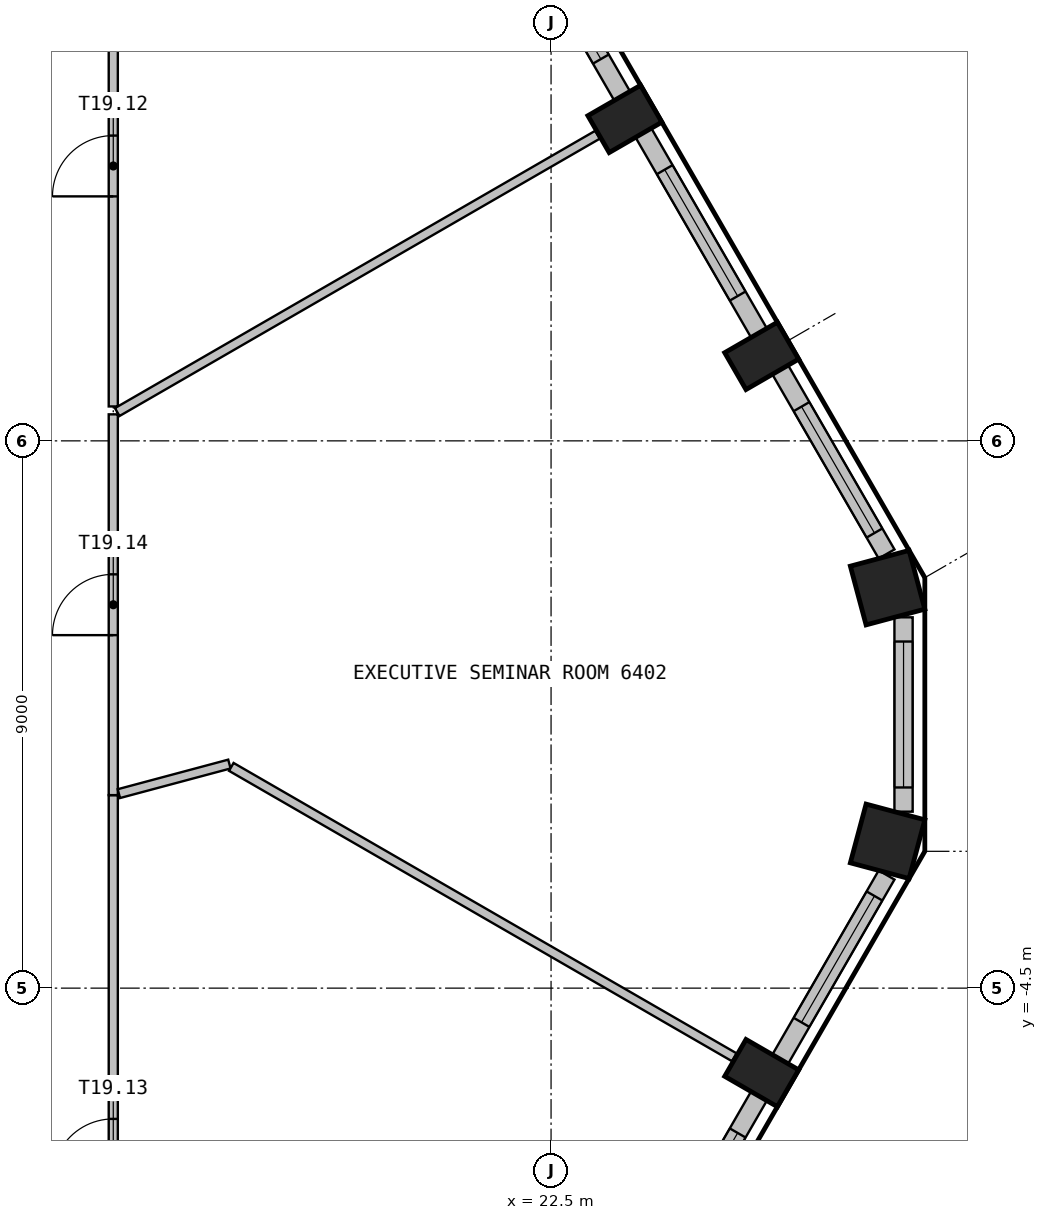
"""IFC4 building model, lengths in metres.
Left out: names, types, materials, properties, quantities, classifications, styles, units other than length and angle.
Written with IfcOpenShell. Run it as: python <this file> out.ifc"""

import sys

from ifc_helpers import new_model, si_unit, direction, frame, frame_2d, origin, origin_2d, place, context, subcontext, project, spatial, rectangle, extrude, element, fill, save


model = new_model("IFC4")
c1 = context("Model", 3, precision=1e-05, world=origin(), true_north=direction((0.0, 1.0)))
c2 = subcontext(c1, "Body", "Model", "MODEL_VIEW")
j1 = project(units=[si_unit("LENGTHUNIT", "METRE"), si_unit("PLANEANGLEUNIT", "RADIAN")], contexts=[c1])
p1 = place(None, origin())
s1 = spatial("IfcSite", under=j1, at=p1, CompositionType="ELEMENT")
p2 = place(p1, origin())
s2 = spatial("IfcBuilding", under=s1, at=p2, CompositionType="ELEMENT")
p3 = place(p2, frame((0.0, 0.0, 258.6)))
s3 = spatial("IfcBuildingStorey", under=s2, at=p3, CompositionType="ELEMENT", Elevation=258.6)
p4 = place(p3, frame((25.964, -5.897, 0.0), z_axis=(0.0, 0.0, 1.0), x_axis=(0.5, 0.866025403784, 0.0)))
e1 = element("IfcColumn", 1, at=p4, inside=s3, PredefinedType="COLUMN", context=c2, shape_type="SweptSolid", body=[
    extrude(rectangle(XDim=0.7, YDim=1.0, at=origin_2d()), origin(), (0.0, 0.0, 1.0), 3.575),
])
for number, where, z_axis, x_axis in (
    (2, (28.035, -2.086, 0.0), (0.0, 0.0, 1.0), (0.259, 0.966, 0.0)),
    (3, (28.035, 2.086, 0.0), (0.0, 0.0, 1.0), (-0.259, 0.966, 0.0)),
):
    element("IfcColumn", number, at=place(p3, frame(where, z_axis=z_axis, x_axis=x_axis)), inside=s3, PredefinedType="COLUMN", context=c2, shape_type="SweptSolid", body=[
        extrude(rectangle(XDim=1.0, YDim=1.0, at=origin_2d()), origin(), (0.0, 0.0, 1.0), 3.575),
    ])
for number, where, z_axis, x_axis in (
    (4, (25.964, 5.897, 0.0), (0.0, 0.0, 1.0), (-0.5, 0.866, 0.0)),
    (5, (23.714, 9.794, 0.0), (0.0, 0.0, 1.0), (-0.5, 0.866, 0.0)),
):
    element("IfcColumn", number, at=place(p3, frame(where, z_axis=z_axis, x_axis=x_axis)), inside=s3, PredefinedType="COLUMN", context=c2, shape_type="SweptSolid", body=[
        extrude(rectangle(XDim=0.7, YDim=1.0, at=origin_2d()), origin(), (0.0, 0.0, 1.0), 3.575),
    ])
p5 = place(p3, frame((24.019, -9.566, 0.0), z_axis=(0.0, 0.0, 1.0), x_axis=(0.499982058975, 0.866035761792, 0.0)))
e6 = element("IfcWall", 6, at=p5, inside=s3, PredefinedType="SOLIDWALL", context=c2, shape_type="SweptSolid", body=[
    extrude(rectangle(XDim=3.799, YDim=0.3, at=frame_2d((1.899, 0.0))), origin(), (0.0, 0.0, 1.0), 3.575),
])
p6 = place(p5, frame((0.699, 0.0, 0.9)))
e7 = element("IfcOpeningElement", 7, at=p6, cuts=e6, PredefinedType="OPENING", context=c2, shape_type="SweptSolid", body=[
    extrude(rectangle(XDim=2.4, YDim=2.1, at=frame_2d((1.2, 1.05))), frame((0.0, 0.16, 0.0), z_axis=(0.0, -1.0, 0.0), x_axis=(1.0, 0.0, 0.0)), (0.0, 0.0, 1.0), 0.32),
])
p7 = place(p3, frame((26.269, -5.669, 0.0), z_axis=(0.0, 0.0, 1.0), x_axis=(0.499990325971, 0.866030989016, 0.0)))
e8 = element("IfcWall", 8, at=p7, inside=s3, PredefinedType="SOLIDWALL", context=c2, shape_type="SweptSolid", body=[
    extrude(rectangle(XDim=3.498, YDim=0.3, at=frame_2d((1.749, 0.0))), origin(), (0.0, 0.0, 1.0), 3.575),
])
p8 = place(p7, frame((0.699, 0.0, 0.9)))
e9 = element("IfcOpeningElement", 9, at=p8, cuts=e8, PredefinedType="OPENING", context=c2, shape_type="SweptSolid", body=[
    extrude(rectangle(XDim=2.4, YDim=2.1, at=frame_2d((1.2, 1.05))), frame((0.0, 0.16, 0.0), z_axis=(0.0, -1.0, 0.0), x_axis=(1.0, 0.0, 0.0)), (0.0, 0.0, 1.0), 0.32),
])
p9 = place(p3, frame((28.297, -1.598, 0.0), z_axis=(0.0, 0.0, 1.0), x_axis=(0.0, 1.0, 0.0)))
e10 = element("IfcWall", 10, at=p9, inside=s3, PredefinedType="SOLIDWALL", context=c2, shape_type="SweptSolid", body=[
    extrude(rectangle(XDim=3.196, YDim=0.3, at=frame_2d((1.598, 0.0))), origin(), (0.0, 0.0, 1.0), 3.575),
])
p10 = place(p9, frame((0.398, 0.0, 0.9)))
e11 = element("IfcOpeningElement", 11, at=p10, cuts=e10, PredefinedType="OPENING", context=c2, shape_type="SweptSolid", body=[
    extrude(rectangle(XDim=2.4, YDim=2.1, at=frame_2d((1.2, 1.05))), frame((0.0, 0.16, 0.0), z_axis=(0.0, -1.0, 0.0), x_axis=(1.0, 0.0, 0.0)), (0.0, 0.0, 1.0), 0.32),
])
p11 = place(p3, frame((28.018, 2.64, 0.0), z_axis=(0.0, 0.0, 1.0), x_axis=(-0.499990325971, 0.866030989016, 0.0)))
e12 = element("IfcWall", 12, at=p11, inside=s3, PredefinedType="SOLIDWALL", context=c2, shape_type="SweptSolid", body=[
    extrude(rectangle(XDim=3.498, YDim=0.3, at=frame_2d((1.749, 0.0))), origin(), (0.0, 0.0, 1.0), 3.575),
])
p12 = place(p11, frame((0.398, 0.0, 0.9)))
e13 = element("IfcOpeningElement", 13, at=p12, cuts=e12, PredefinedType="OPENING", context=c2, shape_type="SweptSolid", body=[
    extrude(rectangle(XDim=2.4, YDim=2.1, at=frame_2d((1.2, 1.05))), frame((0.0, 0.16, 0.0), z_axis=(0.0, -1.0, 0.0), x_axis=(1.0, 0.0, 0.0)), (0.0, 0.0, 1.0), 0.32),
])
p13 = place(p3, frame((25.919, 6.276, 0.0), z_axis=(0.0, 0.0, 1.0), x_axis=(-0.499982058975, 0.866035761792, 0.0)))
e14 = element("IfcWall", 14, at=p13, inside=s3, PredefinedType="SOLIDWALL", context=c2, shape_type="SweptSolid", body=[
    extrude(rectangle(XDim=3.799, YDim=0.3, at=frame_2d((1.899, 0.0))), origin(), (0.0, 0.0, 1.0), 3.575),
])
p14 = place(p13, frame((0.699, 0.0, 0.9)))
e15 = element("IfcOpeningElement", 15, at=p14, cuts=e14, PredefinedType="OPENING", context=c2, shape_type="SweptSolid", body=[
    extrude(rectangle(XDim=2.4, YDim=2.1, at=frame_2d((1.2, 1.05))), frame((0.0, 0.16, 0.0), z_axis=(0.0, -1.0, 0.0), x_axis=(1.0, 0.0, 0.0)), (0.0, 0.0, 1.0), 0.32),
])
p15 = place(p3, frame((23.669, 10.173, 0.0), z_axis=(0.0, 0.0, 1.0), x_axis=(-0.499982058975, 0.866035761792, 0.0)))
e16 = element("IfcWall", 16, at=p15, inside=s3, PredefinedType="SOLIDWALL", context=c2, shape_type="SweptSolid", body=[
    extrude(rectangle(XDim=3.799, YDim=0.3, at=frame_2d((1.899, 0.0))), origin(), (0.0, 0.0, 1.0), 3.575),
])
p16 = place(p15, frame((0.699, 0.0, 0.9)))
e17 = element("IfcOpeningElement", 17, at=p16, cuts=e16, PredefinedType="OPENING", context=c2, shape_type="SweptSolid", body=[
    extrude(rectangle(XDim=2.4, YDim=2.1, at=frame_2d((1.2, 1.05))), frame((0.0, 0.16, 0.0), z_axis=(0.0, -1.0, 0.0), x_axis=(1.0, 0.0, 0.0)), (0.0, 0.0, 1.0), 0.32),
])
p17 = place(p3, frame((15.3, -12.975, 0.0), z_axis=(0.0, 0.0, 1.0), x_axis=(0.0, 1.0, 0.0)))
e18 = element("IfcWall", 18, at=p17, inside=s3, PredefinedType="PARTITIONING", context=c2, shape_type="SweptSolid", body=[
    extrude(rectangle(XDim=11.649, YDim=0.15, at=frame_2d((5.825, 0.0))), origin(), (0.0, 0.0, 1.0), 3.575),
])
p18 = place(p17, frame((5.324, 0.0, 0.0)))
e19 = element("IfcOpeningElement", 19, at=p18, cuts=e18, PredefinedType="OPENING", context=c2, shape_type="SweptSolid", body=[
    extrude(rectangle(XDim=1.0, YDim=2.1, at=frame_2d((0.5, 1.05))), frame((0.0, 0.085, 0.0), z_axis=(0.0, -1.0, 0.0), x_axis=(1.0, 0.0, 0.0)), (0.0, 0.0, 1.0), 0.17),
])
p19 = place(p3, frame((15.3, -1.326, 0.0), z_axis=(0.0, 0.0, 1.0), x_axis=(0.0, 1.0, 0.0)))
e20 = element("IfcWall", 20, at=p19, inside=s3, PredefinedType="PARTITIONING", context=c2, shape_type="SweptSolid", body=[
    extrude(rectangle(XDim=6.262, YDim=0.15, at=frame_2d((3.131, 0.0))), origin(), (0.0, 0.0, 1.0), 3.575),
])
p20 = place(p19, frame((2.631, 0.0, 0.0)))
e21 = element("IfcOpeningElement", 21, at=p20, cuts=e20, PredefinedType="OPENING", context=c2, shape_type="SweptSolid", body=[
    extrude(rectangle(XDim=1.0, YDim=2.1, at=frame_2d((0.5, 1.05))), frame((0.0, 0.085, 0.0), z_axis=(0.0, -1.0, 0.0), x_axis=(1.0, 0.0, 0.0)), (0.0, 0.0, 1.0), 0.17),
])
p21 = place(p3, frame((15.392, -1.302, 0.0), z_axis=(0.0, 0.0, 1.0), x_axis=(0.966004184231, 0.258526432009, 0.0)))
e22 = element("IfcWall", 22, at=p21, inside=s3, PredefinedType="PARTITIONING", context=c2, shape_type="SweptSolid", body=[
    extrude(rectangle(XDim=1.882, YDim=0.15, at=frame_2d((0.941, 0.0))), origin(), (0.0, 0.0, 1.0), 3.575),
])
p22 = place(p3, frame((15.3, 5.066, 0.0), z_axis=(0.0, 0.0, 1.0), x_axis=(0.0, 1.0, 0.0)))
e23 = element("IfcWall", 23, at=p22, inside=s3, PredefinedType="PARTITIONING", context=c2, shape_type="SweptSolid", body=[
    extrude(rectangle(XDim=7.909, YDim=0.15, at=frame_2d((3.955, 0.0))), origin(), (0.0, 0.0, 1.0), 3.575),
])
p23 = place(p22, frame((3.455, 0.0, 0.0)))
e24 = element("IfcOpeningElement", 24, at=p23, cuts=e23, PredefinedType="OPENING", context=c2, shape_type="SweptSolid", body=[
    extrude(rectangle(XDim=1.0, YDim=2.1, at=frame_2d((0.5, 1.05))), frame((0.0, 0.085, 0.0), z_axis=(0.0, -1.0, 0.0), x_axis=(1.0, 0.0, 0.0)), (0.0, 0.0, 1.0), 0.17),
])
p24 = place(p3, frame((23.264, 9.534, 0.0), z_axis=(0.0, 0.0, 1.0), x_axis=(-0.866009068046, -0.500028293261, 0.0)))
e25 = element("IfcWall", 25, at=p24, inside=s3, PredefinedType="PARTITIONING", context=c2, shape_type="SweptSolid", body=[
    extrude(rectangle(XDim=9.121, YDim=0.15, at=frame_2d((4.561, 0.0))), origin(), (0.0, 0.0, 1.0), 3.575),
])
p25 = place(p3, frame((17.241, -0.862, 0.0), z_axis=(0.0, 0.0, 1.0), x_axis=(0.86605322396, -0.499951810946, 0.0)))
e26 = element("IfcWall", 26, at=p25, inside=s3, PredefinedType="PARTITIONING", context=c2, shape_type="SweptSolid", body=[
    extrude(rectangle(XDim=9.552, YDim=0.15, at=frame_2d((4.776, 0.0))), origin(), (0.0, 0.0, 1.0), 3.575),
])
p26 = place(p6, origin())
e27 = element("IfcWindow", 27, at=p26, inside=s3, PartitioningType="SINGLE_PANEL", PredefinedType="WINDOW", context=c2, shape_type="SweptSolid", body=[
    extrude(rectangle(XDim=2.4, YDim=2.1, at=frame_2d((1.2, 1.05))), frame((0.0, 0.03, 0.0), z_axis=(0.0, -1.0, 0.0), x_axis=(1.0, 0.0, 0.0)), (0.0, 0.0, 1.0), 0.06),
])
fill(e7, e27)
p27 = place(p8, origin())
e28 = element("IfcWindow", 28, at=p27, inside=s3, PartitioningType="SINGLE_PANEL", PredefinedType="WINDOW", context=c2, shape_type="SweptSolid", body=[
    extrude(rectangle(XDim=2.4, YDim=2.1, at=frame_2d((1.2, 1.05))), frame((0.0, 0.03, 0.0), z_axis=(0.0, -1.0, 0.0), x_axis=(1.0, 0.0, 0.0)), (0.0, 0.0, 1.0), 0.06),
])
fill(e9, e28)
p28 = place(p10, origin())
e29 = element("IfcWindow", 29, at=p28, inside=s3, PartitioningType="SINGLE_PANEL", PredefinedType="WINDOW", context=c2, shape_type="SweptSolid", body=[
    extrude(rectangle(XDim=2.4, YDim=2.1, at=frame_2d((1.2, 1.05))), frame((0.0, 0.03, 0.0), z_axis=(0.0, -1.0, 0.0), x_axis=(1.0, 0.0, 0.0)), (0.0, 0.0, 1.0), 0.06),
])
fill(e11, e29)
p29 = place(p12, origin())
e30 = element("IfcWindow", 30, at=p29, inside=s3, PartitioningType="SINGLE_PANEL", PredefinedType="WINDOW", context=c2, shape_type="SweptSolid", body=[
    extrude(rectangle(XDim=2.4, YDim=2.1, at=frame_2d((1.2, 1.05))), frame((0.0, 0.03, 0.0), z_axis=(0.0, -1.0, 0.0), x_axis=(1.0, 0.0, 0.0)), (0.0, 0.0, 1.0), 0.06),
])
fill(e13, e30)
p30 = place(p14, origin())
e31 = element("IfcWindow", 31, at=p30, inside=s3, PartitioningType="SINGLE_PANEL", PredefinedType="WINDOW", context=c2, shape_type="SweptSolid", body=[
    extrude(rectangle(XDim=2.4, YDim=2.1, at=frame_2d((1.2, 1.05))), frame((0.0, 0.03, 0.0), z_axis=(0.0, -1.0, 0.0), x_axis=(1.0, 0.0, 0.0)), (0.0, 0.0, 1.0), 0.06),
])
fill(e15, e31)
p31 = place(p16, origin())
e32 = element("IfcWindow", 32, at=p31, inside=s3, PartitioningType="SINGLE_PANEL", PredefinedType="WINDOW", context=c2, shape_type="SweptSolid", body=[
    extrude(rectangle(XDim=2.4, YDim=2.1, at=frame_2d((1.2, 1.05))), frame((0.0, 0.03, 0.0), z_axis=(0.0, -1.0, 0.0), x_axis=(1.0, 0.0, 0.0)), (0.0, 0.0, 1.0), 0.06),
])
fill(e17, e32)
p32 = place(p23, origin())
e33 = element("IfcDoor", 33, at=p32, inside=s3, OperationType="SINGLE_SWING_RIGHT", PredefinedType="DOOR", context=c2, shape_type="SweptSolid", body=[
    extrude(rectangle(XDim=1.0, YDim=2.1, at=frame_2d((0.5, 1.05))), frame((0.0, 0.025, 0.0), z_axis=(0.0, -1.0, 0.0), x_axis=(1.0, 0.0, 0.0)), (0.0, 0.0, 1.0), 0.05),
])
fill(e24, e33)
p33 = place(p18, origin())
e34 = element("IfcDoor", 34, at=p33, inside=s3, OperationType="SINGLE_SWING_LEFT", PredefinedType="DOOR", context=c2, shape_type="SweptSolid", body=[
    extrude(rectangle(XDim=1.0, YDim=2.1, at=frame_2d((0.5, 1.05))), frame((0.0, 0.025, 0.0), z_axis=(0.0, -1.0, 0.0), x_axis=(1.0, 0.0, 0.0)), (0.0, 0.0, 1.0), 0.05),
])
fill(e19, e34)
p34 = place(p20, origin())
e35 = element("IfcDoor", 35, at=p34, inside=s3, OperationType="SINGLE_SWING_RIGHT", PredefinedType="DOOR", context=c2, shape_type="SweptSolid", body=[
    extrude(rectangle(XDim=1.0, YDim=2.1, at=frame_2d((0.5, 1.05))), frame((0.0, 0.025, 0.0), z_axis=(0.0, -1.0, 0.0), x_axis=(1.0, 0.0, 0.0)), (0.0, 0.0, 1.0), 0.05),
])
fill(e21, e35)
save(model, sys.argv[1])
